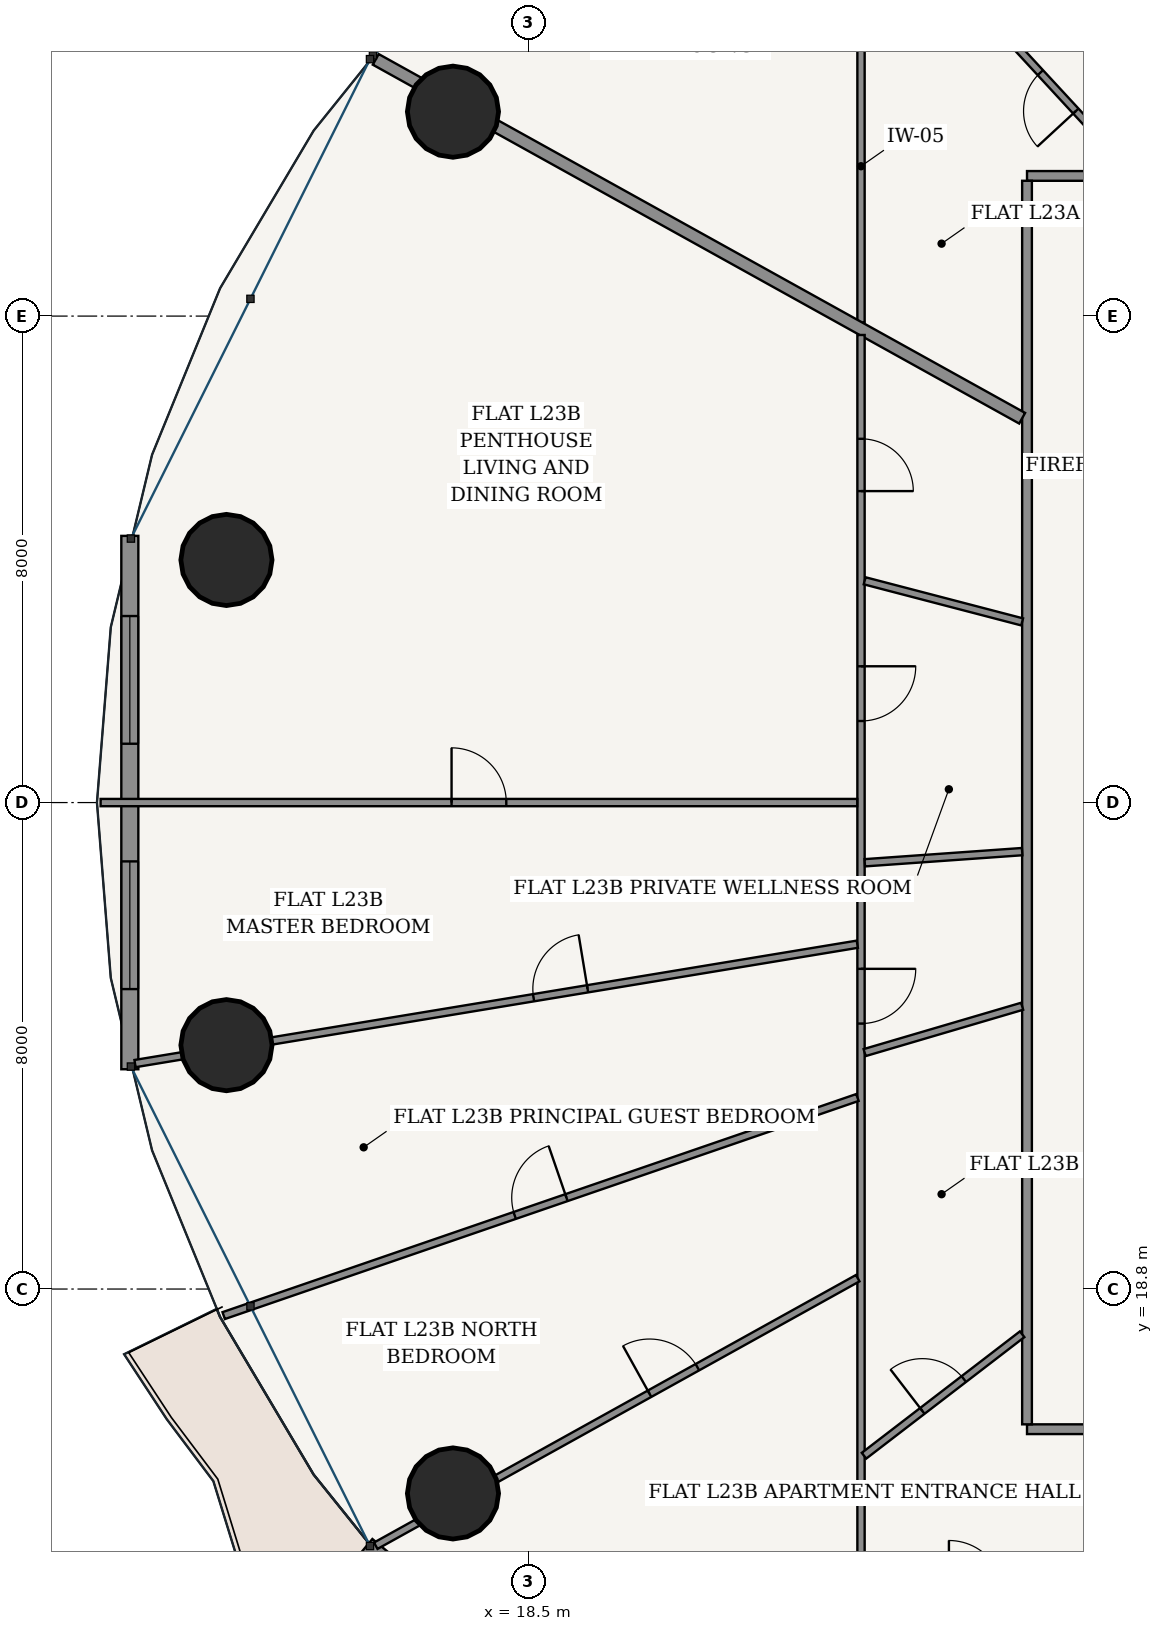
"""IFC4 building model, lengths in metres.
Left out: names, types, materials, properties, quantities, classifications, styles, units other than length and angle.
Written with IfcOpenShell. Run it as: python <this file> out.ifc"""

import sys

from ifc_helpers import new_model, si_unit, direction, frame, frame_2d, origin, origin_2d, place, context, subcontext, project, spatial, rectangle, hollow_circle, extrude, source, transform, mapped, element, fill, save


model = new_model("IFC4")
c1 = context("Model", 3, precision=1e-05, world=origin(), true_north=direction((-0.2419218956, 0.970295726276)))
c2 = subcontext(c1, "Body", "Model", "MODEL_VIEW")
j1 = project(units=[si_unit("LENGTHUNIT", "METRE"), si_unit("PLANEANGLEUNIT", "RADIAN")], contexts=[c1])
p1 = place(None, origin())
s1 = spatial("IfcSite", under=j1, at=p1, CompositionType="ELEMENT")
p2 = place(p1, origin())
s2 = spatial("IfcBuilding", under=s1, at=p2, CompositionType="ELEMENT")
p3 = place(p2, frame((0.0, 0.0, 90.6)))
s3 = spatial("IfcBuildingStorey", under=s2, at=p3, CompositionType="ELEMENT", Elevation=90.6)
for number, where, z_axis, x_axis in (
    (1, (17.255, 38.161, 0.0), (0.0, 0.0, 1.0), (1.0, 0.0, 0.0)),
    (2, (13.529, 30.79, 0.0), (0.0, 0.0, 1.0), (1.0, 0.0, 0.0)),
    (3, (13.529, 22.81, 0.0), (0.0, 0.0, 1.0), (1.0, 0.0, 0.0)),
    (4, (17.255, 15.438, 0.0), (0.0, 0.0, 1.0), (1.0, 0.0, 0.0)),
):
    element("IfcColumn", number, at=place(p3, frame(where, z_axis=z_axis, x_axis=x_axis)), inside=s3, PredefinedType="COLUMN", context=c2, shape_type="SweptSolid", body=[
        extrude(hollow_circle(Radius=0.75, WallThickness=0.045, at=origin_2d()), origin(), (0.0, 0.0, 1.0), 3.6),
    ])
p4 = place(p3, frame((11.94, 31.186, 0.0), z_axis=(0.0, 0.0, 1.0), x_axis=(0.0, -1.0, 0.0)))
e5 = element("IfcWall", 5, at=p4, inside=s3, PredefinedType="SOLIDWALL", context=c2, shape_type="SweptSolid", body=[
    extrude(rectangle(XDim=8.771, YDim=0.28, at=frame_2d((4.386, 0.0))), origin(), (0.0, 0.0, 1.0), 3.325),
])
p5 = place(p4, frame((1.318, 0.0, 0.85)))
e6 = element("IfcOpeningElement", 6, at=p5, cuts=e5, PredefinedType="OPENING", context=c2, shape_type="SweptSolid", body=[
    extrude(rectangle(XDim=2.1, YDim=1.95, at=frame_2d((1.05, 0.975))), frame((0.0, 0.15, 0.0), z_axis=(0.0, -1.0, 0.0), x_axis=(1.0, 0.0, 0.0)), (0.0, 0.0, 1.0), 0.3),
])
p6 = place(p4, frame((5.353, 0.0, 0.85)))
e7 = element("IfcOpeningElement", 7, at=p6, cuts=e5, PredefinedType="OPENING", context=c2, shape_type="SweptSolid", body=[
    extrude(rectangle(XDim=2.1, YDim=1.95, at=frame_2d((1.05, 0.975))), frame((0.0, 0.15, 0.0), z_axis=(0.0, -1.0, 0.0), x_axis=(1.0, 0.0, 0.0)), (0.0, 0.0, 1.0), 0.3),
])
p7 = place(p3, frame((15.846, 14.59, 0.0), z_axis=(0.0, 0.0, 1.0), x_axis=(0.769254958887, -0.638941944333, 0.0)))
e8 = element("IfcWall", 8, at=p7, inside=s3, PredefinedType="SOLIDWALL", context=c2, shape_type="SweptSolid", body=[
    extrude(rectangle(XDim=9.69, YDim=0.26, at=frame_2d((4.845, 0.0))), origin(), (0.0, 0.0, 1.0), 3.325),
])
p8 = place(p7, frame((4.17, 0.0, 0.0)))
e9 = element("IfcOpeningElement", 9, at=p8, cuts=e8, PredefinedType="OPENING", context=c2, shape_type="SweptSolid", body=[
    extrude(rectangle(XDim=1.35, YDim=2.2, at=frame_2d((0.675, 1.1))), frame((0.0, 0.14, 0.0), z_axis=(0.0, -1.0, 0.0), x_axis=(1.0, 0.0, 0.0)), (0.0, 0.0, 1.0), 0.28),
])
p9 = place(p3, frame((26.695, 16.495, 0.0), z_axis=(0.0, 0.0, 1.0), x_axis=(1.0, 0.0, 0.0)))
e10 = element("IfcWall", 10, at=p9, inside=s3, PredefinedType="PARTITIONING", context=c2, shape_type="SweptSolid", body=[
    extrude(rectangle(XDim=22.61, YDim=0.16, at=frame_2d((11.305, 0.0))), origin(), (0.0, 0.0, 1.0), 2.767),
])
p10 = place(p9, frame((1.688, 0.0, 0.0)))
e11 = element("IfcOpeningElement", 11, at=p10, cuts=e10, PredefinedType="OPENING", context=c2, shape_type="SweptSolid", body=[
    extrude(rectangle(XDim=0.98, YDim=2.2, at=frame_2d((0.49, 1.1))), frame((0.0, 0.09, 0.0), z_axis=(0.0, -1.0, 0.0), x_axis=(1.0, 0.0, 0.0)), (0.0, 0.0, 1.0), 0.18),
])
p11 = place(p9, frame((16.137, 0.0, 0.0)))
e12 = element("IfcOpeningElement", 12, at=p11, cuts=e10, PredefinedType="OPENING", context=c2, shape_type="SweptSolid", body=[
    extrude(rectangle(XDim=0.98, YDim=2.2, at=frame_2d((0.49, 1.1))), frame((0.0, 0.09, 0.0), z_axis=(0.0, -1.0, 0.0), x_axis=(1.0, 0.0, 0.0)), (0.0, 0.0, 1.0), 0.18),
])
p12 = place(p3, frame((26.695, 37.105, 0.0), z_axis=(0.0, 0.0, 1.0), x_axis=(1.0, 0.0, 0.0)))
e13 = element("IfcWall", 13, at=p12, inside=s3, PredefinedType="PARTITIONING", context=c2, shape_type="SweptSolid", body=[
    extrude(rectangle(XDim=22.61, YDim=0.16, at=frame_2d((11.305, 0.0))), origin(), (0.0, 0.0, 1.0), 2.767),
])
p13 = place(p12, frame((18.058, 0.0, 0.0)))
e14 = element("IfcOpeningElement", 14, at=p13, cuts=e13, PredefinedType="OPENING", context=c2, shape_type="SweptSolid", body=[
    extrude(rectangle(XDim=0.98, YDim=2.2, at=frame_2d((0.49, 1.1))), frame((0.0, 0.09, 0.0), z_axis=(0.0, -1.0, 0.0), x_axis=(1.0, 0.0, 0.0)), (0.0, 0.0, 1.0), 0.18),
])
p14 = place(p3, frame((26.695, 16.575, 0.0), z_axis=(0.0, 0.0, 1.0), x_axis=(0.0, 1.0, 0.0)))
e15 = element("IfcWall", 15, at=p14, inside=s3, PredefinedType="PARTITIONING", context=c2, shape_type="SweptSolid", body=[
    extrude(rectangle(XDim=20.45, YDim=0.16, at=frame_2d((10.225, 0.0))), origin(), (0.0, 0.0, 1.0), 2.767),
])
p15 = place(p3, frame((23.965, 34.693, 0.0), z_axis=(0.0, 0.0, 1.0), x_axis=(0.0, 1.0, 0.0)))
e16 = element("IfcWall", 16, at=p15, inside=s3, PredefinedType="PARTITIONING", context=c2, shape_type="SweptSolid", body=[
    extrude(rectangle(XDim=5.142, YDim=0.12, at=frame_2d((2.571, 0.0))), origin(), (0.0, 0.0, 1.0), 3.004),
])
p16 = place(p3, frame((28.409, 37.185, 0.0), z_axis=(0.0, 0.0, 1.0), x_axis=(-0.678451695105, 0.734645014554, 0.0)))
e17 = element("IfcWall", 17, at=p16, inside=s3, PredefinedType="PARTITIONING", context=c2, shape_type="SweptSolid", body=[
    extrude(rectangle(XDim=3.545, YDim=0.12, at=frame_2d((1.772, 0.0))), origin(), (0.0, 0.0, 1.0), 2.767),
])
p17 = place(p16, frame((1.343, 0.0, 0.0)))
e18 = element("IfcOpeningElement", 18, at=p17, cuts=e17, PredefinedType="OPENING", context=c2, shape_type="SweptSolid", body=[
    extrude(rectangle(XDim=0.86, YDim=2.15, at=frame_2d((0.43, 1.075))), frame((0.0, 0.07, 0.0), z_axis=(0.0, -1.0, 0.0), x_axis=(1.0, 0.0, 0.0)), (0.0, 0.0, 1.0), 0.14),
])
p18 = place(p3, frame((26.615, 33.12, 0.0), z_axis=(0.0, 0.0, 1.0), x_axis=(-0.874319192772, 0.485351366692, 0.0)))
e19 = element("IfcWall", 19, at=p18, inside=s3, PredefinedType="PARTITIONING", context=c2, shape_type="SweptSolid", body=[
    extrude(rectangle(XDim=12.158, YDim=0.2, at=frame_2d((6.079, 0.0))), origin(), (0.0, 0.0, 1.0), 2.767),
])
p19 = place(p3, frame((23.965, 13.765, 0.0), z_axis=(0.0, 0.0, 1.0), x_axis=(0.0, 1.0, 0.0)))
e20 = element("IfcWall", 20, at=p19, inside=s3, PredefinedType="PARTITIONING", context=c2, shape_type="SweptSolid", body=[
    extrude(rectangle(XDim=20.725, YDim=0.12, at=frame_2d((10.362, 0.0))), origin(), (0.0, 0.0, 1.0), 2.767),
])
p20 = place(p19, frame((9.401, 0.0, 0.0)))
e21 = element("IfcOpeningElement", 21, at=p20, cuts=e20, PredefinedType="OPENING", context=c2, shape_type="SweptSolid", body=[
    extrude(rectangle(XDim=0.9, YDim=2.15, at=frame_2d((0.45, 1.075))), frame((0.0, 0.07, 0.0), z_axis=(0.0, -1.0, 0.0), x_axis=(1.0, 0.0, 0.0)), (0.0, 0.0, 1.0), 0.14),
])
p21 = place(p19, frame((18.157, 0.0, 0.0)))
e22 = element("IfcOpeningElement", 22, at=p21, cuts=e20, PredefinedType="OPENING", context=c2, shape_type="SweptSolid", body=[
    extrude(rectangle(XDim=0.86, YDim=2.15, at=frame_2d((0.43, 1.075))), frame((0.0, 0.07, 0.0), z_axis=(0.0, -1.0, 0.0), x_axis=(1.0, 0.0, 0.0)), (0.0, 0.0, 1.0), 0.14),
])
p22 = place(p19, frame((14.376, 0.0, 0.0)))
e23 = element("IfcOpeningElement", 23, at=p22, cuts=e20, PredefinedType="OPENING", context=c2, shape_type="SweptSolid", body=[
    extrude(rectangle(XDim=0.9, YDim=2.15, at=frame_2d((0.45, 1.075))), frame((0.0, 0.07, 0.0), z_axis=(0.0, -1.0, 0.0), x_axis=(1.0, 0.0, 0.0)), (0.0, 0.0, 1.0), 0.14),
])
p23 = place(p3, frame((23.903, 26.8, 0.0), z_axis=(0.0, 0.0, 1.0), x_axis=(-1.0, 0.0, 0.0)))
e24 = element("IfcWall", 24, at=p23, inside=s3, PredefinedType="PARTITIONING", context=c2, shape_type="SweptSolid", body=[
    extrude(rectangle(XDim=12.443, YDim=0.12, at=frame_2d((6.222, 0.0))), origin(), (0.0, 0.0, 1.0), 2.767),
])
p24 = place(p23, frame((5.771, 0.0, 0.0)))
e25 = element("IfcOpeningElement", 25, at=p24, cuts=e24, PredefinedType="OPENING", context=c2, shape_type="SweptSolid", body=[
    extrude(rectangle(XDim=0.9, YDim=2.15, at=frame_2d((0.45, 1.075))), frame((0.0, 0.07, 0.0), z_axis=(0.0, -1.0, 0.0), x_axis=(1.0, 0.0, 0.0)), (0.0, 0.0, 1.0), 0.14),
])
p25 = place(p3, frame((23.904, 24.47, 0.0), z_axis=(0.0, 0.0, 1.0), x_axis=(-0.986618264768, -0.163047231274, 0.0)))
e26 = element("IfcWall", 26, at=p25, inside=s3, PredefinedType="PARTITIONING", context=c2, shape_type="SweptSolid", body=[
    extrude(rectangle(XDim=12.039, YDim=0.12, at=frame_2d((6.02, 0.0))), origin(), (0.0, 0.0, 1.0), 2.767),
])
p26 = place(p25, frame((4.496, 0.0, 0.0)))
e27 = element("IfcOpeningElement", 27, at=p26, cuts=e26, PredefinedType="OPENING", context=c2, shape_type="SweptSolid", body=[
    extrude(rectangle(XDim=0.9, YDim=2.15, at=frame_2d((0.45, 1.075))), frame((0.0, 0.07, 0.0), z_axis=(0.0, -1.0, 0.0), x_axis=(1.0, 0.0, 0.0)), (0.0, 0.0, 1.0), 0.14),
])
p27 = place(p3, frame((23.906, 21.95, 0.0), z_axis=(0.0, 0.0, 1.0), x_axis=(-0.945573120726, -0.32540970078, 0.0)))
e28 = element("IfcWall", 28, at=p27, inside=s3, PredefinedType="PARTITIONING", context=c2, shape_type="SweptSolid", body=[
    extrude(rectangle(XDim=11.022, YDim=0.12, at=frame_2d((5.511, 0.0))), origin(), (0.0, 0.0, 1.0), 2.767),
])
p28 = place(p27, frame((5.061, 0.0, 0.0)))
e29 = element("IfcOpeningElement", 29, at=p28, cuts=e28, PredefinedType="OPENING", context=c2, shape_type="SweptSolid", body=[
    extrude(rectangle(XDim=0.9, YDim=2.15, at=frame_2d((0.45, 1.075))), frame((0.0, 0.07, 0.0), z_axis=(0.0, -1.0, 0.0), x_axis=(1.0, 0.0, 0.0)), (0.0, 0.0, 1.0), 0.14),
])
p29 = place(p3, frame((23.911, 18.979, 0.0), z_axis=(0.0, 0.0, 1.0), x_axis=(-0.874313476423, -0.485361664066, 0.0)))
e30 = element("IfcWall", 30, at=p29, inside=s3, PredefinedType="PARTITIONING", context=c2, shape_type="SweptSolid", body=[
    extrude(rectangle(XDim=9.066, YDim=0.12, at=frame_2d((4.533, 0.0))), origin(), (0.0, 0.0, 1.0), 2.767),
])
p30 = place(p29, frame((3.016, 0.0, 0.0)))
e31 = element("IfcOpeningElement", 31, at=p30, cuts=e30, PredefinedType="OPENING", context=c2, shape_type="SweptSolid", body=[
    extrude(rectangle(XDim=0.9, YDim=2.15, at=frame_2d((0.45, 1.075))), frame((0.0, 0.07, 0.0), z_axis=(0.0, -1.0, 0.0), x_axis=(1.0, 0.0, 0.0)), (0.0, 0.0, 1.0), 0.14),
])
p31 = place(p3, frame((26.615, 29.771, 0.0), z_axis=(0.0, 0.0, 1.0), x_axis=(-0.967585302816, 0.252544415449, 0.0)))
e32 = element("IfcWall", 32, at=p31, inside=s3, PredefinedType="PARTITIONING", context=c2, shape_type="SweptSolid", body=[
    extrude(rectangle(XDim=2.677, YDim=0.12, at=frame_2d((1.338, 0.0))), origin(), (0.0, 0.0, 1.0), 3.325),
])
p32 = place(p3, frame((26.615, 25.993, 0.0), z_axis=(0.0, 0.0, 1.0), x_axis=(-0.997500084777, -0.070665273433, 0.0)))
e33 = element("IfcWall", 33, at=p32, inside=s3, PredefinedType="PARTITIONING", context=c2, shape_type="SweptSolid", body=[
    extrude(rectangle(XDim=2.595, YDim=0.12, at=frame_2d((1.297, 0.0))), origin(), (0.0, 0.0, 1.0), 3.325),
])
p33 = place(p3, frame((26.615, 23.45, 0.0), z_axis=(0.0, 0.0, 1.0), x_axis=(-0.959338143787, -0.282259323806, 0.0)))
e34 = element("IfcWall", 34, at=p33, inside=s3, PredefinedType="PARTITIONING", context=c2, shape_type="SweptSolid", body=[
    extrude(rectangle(XDim=2.7, YDim=0.12, at=frame_2d((1.35, 0.0))), origin(), (0.0, 0.0, 1.0), 3.325),
])
p34 = place(p3, frame((26.615, 18.056, 0.0), z_axis=(0.0, 0.0, 1.0), x_axis=(-0.79311360735, -0.609073727751, 0.0)))
e35 = element("IfcWall", 35, at=p34, inside=s3, PredefinedType="PARTITIONING", context=c2, shape_type="SweptSolid", body=[
    extrude(rectangle(XDim=3.279, YDim=0.12, at=frame_2d((1.64, 0.0))), origin(), (0.0, 0.0, 1.0), 3.004),
])
p35 = place(p34, frame((1.21, 0.0, 0.0)))
e36 = element("IfcOpeningElement", 36, at=p35, cuts=e35, PredefinedType="OPENING", context=c2, shape_type="SweptSolid", body=[
    extrude(rectangle(XDim=0.86, YDim=2.15, at=frame_2d((0.43, 1.075))), frame((0.0, 0.07, 0.0), z_axis=(0.0, -1.0, 0.0), x_axis=(1.0, 0.0, 0.0)), (0.0, 0.0, 1.0), 0.14),
])
m1 = source(origin(), c2, "Body", "SweptSolid", [
    extrude(rectangle(XDim=2.1, YDim=1.95, at=frame_2d((1.05, 0.975))), frame((0.0, 0.03, 0.0), z_axis=(0.0, -1.0, 0.0), x_axis=(1.0, 0.0, 0.0)), (0.0, 0.0, 1.0), 0.06),
])
p36 = place(p5, origin())
e37 = element("IfcWindow", 37, at=p36, inside=s3, PartitioningType="SINGLE_PANEL", PredefinedType="WINDOW", context=c2, shape_type="MappedRepresentation", body=[
    mapped(m1, transform((0.0, 0.0, 0.0), scale=1.0)),
])
fill(e6, e37)
p37 = place(p6, origin())
e38 = element("IfcWindow", 38, at=p37, inside=s3, PartitioningType="SINGLE_PANEL", PredefinedType="WINDOW", context=c2, shape_type="MappedRepresentation", body=[
    mapped(m1, transform((0.0, 0.0, 0.0), scale=1.0)),
])
fill(e7, e38)
m2 = source(origin(), c2, "Body", "SweptSolid", [
    extrude(rectangle(XDim=0.86, YDim=2.15, at=frame_2d((0.43, 1.075))), frame((0.0, 0.025, 0.0), z_axis=(0.0, -1.0, 0.0), x_axis=(1.0, 0.0, 0.0)), (0.0, 0.0, 1.0), 0.05),
])
p38 = place(p17, origin())
e39 = element("IfcDoor", 39, at=p38, inside=s3, OperationType="SINGLE_SWING_LEFT", PredefinedType="DOOR", context=c2, shape_type="MappedRepresentation", body=[
    mapped(m2, transform((0.0, 0.0, 0.0), scale=1.0)),
])
fill(e18, e39)
p39 = place(p35, frame((0.86, 0.0, 0.0), z_axis=(0.0, 0.0, 1.0), x_axis=(-1.0, 0.0, 0.0)))
e40 = element("IfcDoor", 40, at=p39, inside=s3, OperationType="SINGLE_SWING_LEFT", PredefinedType="DOOR", context=c2, shape_type="MappedRepresentation", body=[
    mapped(m2, transform((0.0, 0.0, 0.0), scale=1.0)),
])
fill(e36, e40)
m3 = source(origin(), c2, "Body", "SweptSolid", [
    extrude(rectangle(XDim=0.9, YDim=2.15, at=frame_2d((0.45, 1.075))), frame((0.0, 0.025, 0.0), z_axis=(0.0, -1.0, 0.0), x_axis=(1.0, 0.0, 0.0)), (0.0, 0.0, 1.0), 0.05),
])
p40 = place(p30, frame((0.9, 0.0, 0.0), z_axis=(0.0, 0.0, 1.0), x_axis=(-1.0, 0.0, 0.0)))
e41 = element("IfcDoor", 41, at=p40, inside=s3, OperationType="SINGLE_SWING_LEFT", PredefinedType="DOOR", context=c2, shape_type="MappedRepresentation", body=[
    mapped(m3, transform((0.0, 0.0, 0.0), scale=1.0)),
])
fill(e31, e41)
p41 = place(p28, frame((0.9, 0.0, 0.0), z_axis=(0.0, 0.0, 1.0), x_axis=(-1.0, 0.0, 0.0)))
e42 = element("IfcDoor", 42, at=p41, inside=s3, OperationType="SINGLE_SWING_RIGHT", PredefinedType="DOOR", context=c2, shape_type="MappedRepresentation", body=[
    mapped(m3, transform((0.0, 0.0, 0.0), scale=1.0)),
])
fill(e29, e42)
p42 = place(p20, frame((0.9, 0.0, 0.0), z_axis=(0.0, 0.0, 1.0), x_axis=(-1.0, 0.0, 0.0)))
e43 = element("IfcDoor", 43, at=p42, inside=s3, OperationType="SINGLE_SWING_LEFT", PredefinedType="DOOR", context=c2, shape_type="MappedRepresentation", body=[
    mapped(m3, transform((0.0, 0.0, 0.0), scale=1.0)),
])
fill(e21, e43)
p43 = place(p26, frame((0.9, 0.0, 0.0), z_axis=(0.0, 0.0, 1.0), x_axis=(-1.0, 0.0, 0.0)))
e44 = element("IfcDoor", 44, at=p43, inside=s3, OperationType="SINGLE_SWING_RIGHT", PredefinedType="DOOR", context=c2, shape_type="MappedRepresentation", body=[
    mapped(m3, transform((0.0, 0.0, 0.0), scale=1.0)),
])
fill(e27, e44)
p44 = place(p24, frame((0.9, 0.0, 0.0), z_axis=(0.0, 0.0, 1.0), x_axis=(-1.0, 0.0, 0.0)))
e45 = element("IfcDoor", 45, at=p44, inside=s3, OperationType="SINGLE_SWING_LEFT", PredefinedType="DOOR", context=c2, shape_type="MappedRepresentation", body=[
    mapped(m3, transform((0.0, 0.0, 0.0), scale=1.0)),
])
fill(e25, e45)
p45 = place(p21, frame((0.86, 0.0, 0.0), z_axis=(0.0, 0.0, 1.0), x_axis=(-1.0, 0.0, 0.0)))
e46 = element("IfcDoor", 46, at=p45, inside=s3, OperationType="SINGLE_SWING_RIGHT", PredefinedType="DOOR", context=c2, shape_type="MappedRepresentation", body=[
    mapped(m2, transform((0.0, 0.0, 0.0), scale=1.0)),
])
fill(e22, e46)
p46 = place(p22, frame((0.9, 0.0, 0.0), z_axis=(0.0, 0.0, 1.0), x_axis=(-1.0, 0.0, 0.0)))
e47 = element("IfcDoor", 47, at=p46, inside=s3, OperationType="SINGLE_SWING_LEFT", PredefinedType="DOOR", context=c2, shape_type="MappedRepresentation", body=[
    mapped(m3, transform((0.0, 0.0, 0.0), scale=1.0)),
])
fill(e23, e47)
save(model, sys.argv[1])
